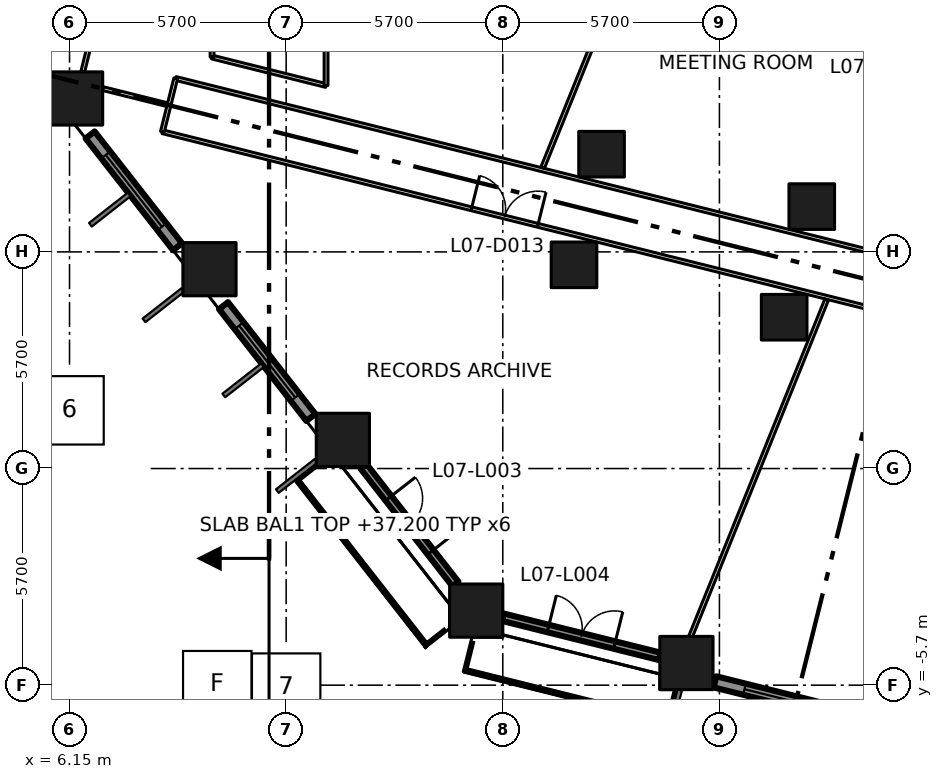
"""IFC4 building model, lengths in metres.
Left out: names, types, materials, properties, quantities, classifications, styles, units other than length and angle.
Written with IfcOpenShell. Run it as: python <this file> out.ifc"""

import sys

from ifc_helpers import new_model, si_unit, direction, frame, frame_2d, origin, origin_2d, place, context, subcontext, project, spatial, rectangle, extrude, element, fill, save


model = new_model("IFC4")
c1 = context("Model", 3, precision=1e-05, world=origin(), true_north=direction((0.0, 1.0)))
c2 = subcontext(c1, "Body", "Model", "MODEL_VIEW")
j1 = project(units=[si_unit("LENGTHUNIT", "METRE"), si_unit("PLANEANGLEUNIT", "RADIAN")], contexts=[c1])
p1 = place(None, origin())
s1 = spatial("IfcSite", under=j1, at=p1, CompositionType="ELEMENT")
p2 = place(p1, origin())
s2 = spatial("IfcBuilding", under=s1, at=p2, CompositionType="ELEMENT")
p3 = place(p2, frame((0.0, 0.0, 37.2)))
s3 = spatial("IfcBuildingStorey", under=s2, at=p3, CompositionType="ELEMENT", Elevation=37.2)
for number, where, z_axis, x_axis in (
    (1, (16.851, -3.738, 0.0), (0.0, 0.0, 1.0), (1.0, 0.0, 0.0)),
    (2, (13.342, 0.754, 0.0), (0.0, 0.0, 1.0), (1.0, 0.0, 0.0)),
    (3, (9.833, 5.245, 0.0), (0.0, 0.0, 1.0), (1.0, 0.0, 0.0)),
    (4, (6.323, 9.737, 0.0), (0.0, 0.0, 1.0), (1.0, 0.0, 0.0)),
    (5, (22.382, -5.117, 0.0), (0.0, 0.0, 1.0), (1.0, 0.0, 0.0)),
):
    element("IfcColumn", number, at=place(p3, frame(where, z_axis=z_axis, x_axis=x_axis)), inside=s3, PredefinedType="COLUMN", context=c2, shape_type="SweptSolid", body=[
        extrude(rectangle(XDim=1.4, YDim=1.4, at=origin_2d()), origin(), (0.0, 0.0, 1.0), 4.2),
    ])
for number, where, z_axis, x_axis in (
    (6, (19.424, 5.36, 0.0), (0.0, 0.0, 1.0), (1.0, 0.0, 0.0)),
    (7, (24.954, 3.981, 0.0), (0.0, 0.0, 1.0), (1.0, 0.0, 0.0)),
    (8, (20.149, 8.271, 0.0), (0.0, 0.0, 1.0), (1.0, 0.0, 0.0)),
    (9, (25.68, 6.892, 0.0), (0.0, 0.0, 1.0), (1.0, 0.0, 0.0)),
):
    element("IfcColumn", number, at=place(p3, frame(where, z_axis=z_axis, x_axis=x_axis)), inside=s3, PredefinedType="COLUMN", context=c2, shape_type="SweptSolid", body=[
        extrude(rectangle(XDim=1.2, YDim=1.2, at=origin_2d()), origin(), (0.0, 0.0, 1.0), 4.2),
    ])
p4 = place(p3, frame((6.692, 8.778, 0.0), z_axis=(0.0, 0.0, 1.0), x_axis=(0.615767067156, -0.787928244833, 0.0)))
e10 = element("IfcWall", 10, at=p4, inside=s3, PredefinedType="SOLIDWALL", context=c2, shape_type="SweptSolid", body=[
    extrude(rectangle(XDim=3.735, YDim=0.3, at=frame_2d((1.868, 0.0))), origin(), (0.0, 0.0, 1.0), 3.1),
])
p5 = place(p4, frame((0.668, 0.0, 0.8)))
e11 = element("IfcOpeningElement", 11, at=p5, cuts=e10, PredefinedType="OPENING", context=c2, shape_type="SweptSolid", body=[
    extrude(rectangle(XDim=2.4, YDim=2.1, at=frame_2d((1.2, 1.05))), frame((0.0, 0.16, 0.0), z_axis=(0.0, -1.0, 0.0), x_axis=(1.0, 0.0, 0.0)), (0.0, 0.0, 1.0), 0.32),
])
p6 = place(p3, frame((10.202, 4.286, 0.0), z_axis=(0.0, 0.0, 1.0), x_axis=(0.615636430057, -0.788030320474, 0.0)))
e12 = element("IfcWall", 12, at=p6, inside=s3, PredefinedType="SOLIDWALL", context=c2, shape_type="SweptSolid", body=[
    extrude(rectangle(XDim=3.734, YDim=0.3, at=frame_2d((1.867, 0.0))), origin(), (0.0, 0.0, 1.0), 3.1),
])
p7 = place(p6, frame((0.667, 0.0, 0.8)))
e13 = element("IfcOpeningElement", 13, at=p7, cuts=e12, PredefinedType="OPENING", context=c2, shape_type="SweptSolid", body=[
    extrude(rectangle(XDim=2.4, YDim=2.1, at=frame_2d((1.2, 1.05))), frame((0.0, 0.16, 0.0), z_axis=(0.0, -1.0, 0.0), x_axis=(1.0, 0.0, 0.0)), (0.0, 0.0, 1.0), 0.32),
])
p8 = place(p3, frame((13.889, 0.054, 0.0), z_axis=(0.0, 0.0, 1.0), x_axis=(0.615546225508, -0.788100783062, 0.0)))
e14 = element("IfcWall", 14, at=p8, inside=s3, PredefinedType="SOLIDWALL", context=c2, shape_type="SweptSolid", body=[
    extrude(rectangle(XDim=3.923, YDim=0.2, at=frame_2d((1.962, 0.0))), origin(), (0.0, 0.0, 1.0), 3.1),
])
p9 = place(p8, frame((1.061, 0.0, 0.0)))
e15 = element("IfcOpeningElement", 15, at=p9, cuts=e14, PredefinedType="OPENING", context=c2, shape_type="SweptSolid", body=[
    extrude(rectangle(XDim=1.8, YDim=2.9, at=frame_2d((0.9, 1.45))), frame((0.0, 0.11, 0.0), z_axis=(0.0, -1.0, 0.0), x_axis=(1.0, 0.0, 0.0)), (0.0, 0.0, 1.0), 0.22),
])
p10 = place(p3, frame((12.398, -0.199, 0.0), z_axis=(0.0, 0.0, 1.0), x_axis=(0.615638738903, -0.788028516719, 0.0)))
e16 = element("IfcWall", 16, at=p10, inside=s3, PredefinedType="SOLIDWALL", context=c2, shape_type="SweptSolid", body=[
    extrude(rectangle(XDim=5.36, YDim=0.4, at=frame_2d((2.68, 0.0))), origin(), (0.0, 0.0, 1.0), 0.3),
])
p11 = place(p3, frame((17.551, -3.912, 0.0), z_axis=(0.0, 0.0, 1.0), x_axis=(0.970304203713, -0.241887891919, 0.0)))
e17 = element("IfcWall", 17, at=p11, inside=s3, PredefinedType="SOLIDWALL", context=c2, shape_type="SweptSolid", body=[
    extrude(rectangle(XDim=4.257, YDim=0.2, at=frame_2d((2.129, 0.0))), origin(), (0.0, 0.0, 1.0), 3.1),
])
p12 = place(p11, frame((1.228, 0.0, 0.0)))
e18 = element("IfcOpeningElement", 18, at=p12, cuts=e17, PredefinedType="OPENING", context=c2, shape_type="SweptSolid", body=[
    extrude(rectangle(XDim=1.8, YDim=2.9, at=frame_2d((0.9, 1.45))), frame((0.0, 0.11, 0.0), z_axis=(0.0, -1.0, 0.0), x_axis=(1.0, 0.0, 0.0)), (0.0, 0.0, 1.0), 0.22),
])
p13 = place(p3, frame((16.694, -5.069, 0.0), z_axis=(0.0, 0.0, 1.0), x_axis=(0.970289679319, -0.241946147329, 0.0)))
e19 = element("IfcWall", 19, at=p13, inside=s3, PredefinedType="SOLIDWALL", context=c2, shape_type="SweptSolid", body=[
    extrude(rectangle(XDim=5.36, YDim=0.4, at=frame_2d((2.68, 0.0))), origin(), (0.0, 0.0, 1.0), 0.3),
])
p14 = place(p3, frame((23.133, -5.613, 0.0), z_axis=(0.0, 0.0, 1.0), x_axis=(0.970303772127, -0.241889623168, 0.0)))
e20 = element("IfcWall", 20, at=p14, inside=s3, PredefinedType="SOLIDWALL", context=c2, shape_type="SweptSolid", body=[
    extrude(rectangle(XDim=4.002, YDim=0.3, at=frame_2d((2.001, 0.0))), origin(), (0.0, 0.0, 1.0), 3.1),
])
p15 = place(p14, frame((0.801, 0.0, 0.8)))
e21 = element("IfcOpeningElement", 21, at=p15, cuts=e20, PredefinedType="OPENING", context=c2, shape_type="SweptSolid", body=[
    extrude(rectangle(XDim=2.4, YDim=2.1, at=frame_2d((1.2, 1.05))), frame((0.0, 0.16, 0.0), z_axis=(0.0, -1.0, 0.0), x_axis=(1.0, 0.0, 0.0)), (0.0, 0.0, 1.0), 0.32),
])
p16 = place(p3, frame((8.594, 8.862, 0.0), z_axis=(0.0, 0.0, 1.0), x_axis=(0.970293746648, -0.241929835316, 0.0)))
e22 = element("IfcWall", 22, at=p16, inside=s3, PredefinedType="PARTITIONING", context=c2, shape_type="SweptSolid", body=[
    extrude(rectangle(XDim=68.375, YDim=0.1, at=frame_2d((34.188, 0.0))), origin(), (0.0, 0.0, 1.0), 3.9),
])
p17 = place(p16, frame((37.708, 0.0, 0.0)))
e23 = element("IfcOpeningElement", 23, at=p17, cuts=e22, PredefinedType="OPENING", context=c2, shape_type="SweptSolid", body=[
    extrude(rectangle(XDim=1.0, YDim=2.1, at=frame_2d((0.5, 1.05))), frame((0.0, 0.06, 0.0), z_axis=(0.0, -1.0, 0.0), x_axis=(1.0, 0.0, 0.0)), (0.0, 0.0, 1.0), 0.12),
])
p18 = place(p16, frame((42.708, 0.0, 0.0)))
e24 = element("IfcOpeningElement", 24, at=p18, cuts=e22, PredefinedType="OPENING", context=c2, shape_type="SweptSolid", body=[
    extrude(rectangle(XDim=1.8, YDim=2.1, at=frame_2d((0.9, 1.05))), frame((0.0, 0.06, 0.0), z_axis=(0.0, -1.0, 0.0), x_axis=(1.0, 0.0, 0.0)), (0.0, 0.0, 1.0), 0.12),
])
p19 = place(p16, frame((58.508, 0.0, 0.0)))
e25 = element("IfcOpeningElement", 25, at=p19, cuts=e22, PredefinedType="OPENING", context=c2, shape_type="SweptSolid", body=[
    extrude(rectangle(XDim=1.8, YDim=2.1, at=frame_2d((0.9, 1.05))), frame((0.0, 0.06, 0.0), z_axis=(0.0, -1.0, 0.0), x_axis=(1.0, 0.0, 0.0)), (0.0, 0.0, 1.0), 0.12),
])
p20 = place(p16, frame((25.408, 0.0, 0.0)))
e26 = element("IfcOpeningElement", 26, at=p20, cuts=e22, PredefinedType="OPENING", context=c2, shape_type="SweptSolid", body=[
    extrude(rectangle(XDim=1.8, YDim=2.1, at=frame_2d((0.9, 1.05))), frame((0.0, 0.06, 0.0), z_axis=(0.0, -1.0, 0.0), x_axis=(1.0, 0.0, 0.0)), (0.0, 0.0, 1.0), 0.12),
])
p21 = place(p16, frame((31.308, 0.0, 0.0)))
e27 = element("IfcOpeningElement", 27, at=p21, cuts=e22, PredefinedType="OPENING", context=c2, shape_type="SweptSolid", body=[
    extrude(rectangle(XDim=1.0, YDim=2.1, at=frame_2d((0.5, 1.05))), frame((0.0, 0.06, 0.0), z_axis=(0.0, -1.0, 0.0), x_axis=(1.0, 0.0, 0.0)), (0.0, 0.0, 1.0), 0.12),
])
p22 = place(p16, frame((8.38, 0.0, 0.0)))
e28 = element("IfcOpeningElement", 28, at=p22, cuts=e22, PredefinedType="OPENING", context=c2, shape_type="SweptSolid", body=[
    extrude(rectangle(XDim=1.8, YDim=2.1, at=frame_2d((0.9, 1.05))), frame((0.0, 0.06, 0.0), z_axis=(0.0, -1.0, 0.0), x_axis=(1.0, 0.0, 0.0)), (0.0, 0.0, 1.0), 0.12),
])
p23 = place(p3, frame((8.944, 10.264, 0.0), z_axis=(0.0, 0.0, 1.0), x_axis=(0.970300504447, -0.241902730595, 0.0)))
e29 = element("IfcWall", 29, at=p23, inside=s3, PredefinedType="PARTITIONING", context=c2, shape_type="SweptSolid", body=[
    extrude(rectangle(XDim=19.879, YDim=0.1, at=frame_2d((9.939, 0.0))), origin(), (0.0, 0.0, 1.0), 3.9),
])
p24 = place(p3, frame((8.944, 10.264, 0.0), z_axis=(0.0, 0.0, 1.0), x_axis=(-0.242297077633, -0.970202105837, 0.0)))
e30 = element("IfcWall", 30, at=p24, inside=s3, PredefinedType="PARTITIONING", context=c2, shape_type="SweptSolid", body=[
    extrude(rectangle(XDim=1.445, YDim=0.1, at=frame_2d((0.722, 0.0))), origin(), (0.0, 0.0, 1.0), 3.9),
])
p25 = place(p3, frame((9.9, 10.826, 0.0), z_axis=(0.0, 0.0, 1.0), x_axis=(0.970290953223, -0.241941038466, 0.0)))
e31 = element("IfcWall", 31, at=p25, inside=s3, PredefinedType="PARTITIONING", context=c2, shape_type="SweptSolid", body=[
    extrude(rectangle(XDim=3.092, YDim=0.1, at=frame_2d((1.546, 0.0))), origin(), (0.0, 0.0, 1.0), 3.9),
])
p26 = place(p3, frame((9.9, 12.2, 0.0), z_axis=(0.0, 0.0, 1.0), x_axis=(0.0, -1.0, 0.0)))
e32 = element("IfcWall", 32, at=p26, inside=s3, PredefinedType="PARTITIONING", context=c2, shape_type="SweptSolid", body=[
    extrude(rectangle(XDim=1.374, YDim=0.1, at=frame_2d((0.687, 0.0))), origin(), (0.0, 0.0, 1.0), 3.9),
])
p27 = place(p3, frame((12.9, 10.078, 0.0), z_axis=(0.0, 0.0, 1.0), x_axis=(0.0, 1.0, 0.0)))
e33 = element("IfcWall", 33, at=p27, inside=s3, PredefinedType="PARTITIONING", context=c2, shape_type="SweptSolid", body=[
    extrude(rectangle(XDim=4.022, YDim=0.1, at=frame_2d((2.011, 0.0))), origin(), (0.0, 0.0, 1.0), 3.9),
])
p28 = place(p3, frame((6.922, 12.138, 0.0), z_axis=(0.0, 0.0, 1.0), x_axis=(-0.242437328426, -0.970167069007, 0.0)))
e34 = element("IfcWall", 34, at=p28, inside=s3, PredefinedType="PARTITIONING", context=c2, shape_type="SweptSolid", body=[
    extrude(rectangle(XDim=1.753, YDim=0.1, at=frame_2d((0.876, 0.0))), origin(), (0.0, 0.0, 1.0), 3.9),
])
p29 = place(p3, frame((8.72, 9.574, 0.0), z_axis=(0.0, 0.0, 1.0), x_axis=(-0.97016712555, 0.242437102155, 0.0)))
e35 = element("IfcWall", 35, at=p29, inside=s3, PredefinedType="PARTITIONING", context=c2, shape_type="SweptSolid", body=[
    extrude(rectangle(XDim=1.749, YDim=0.1, at=frame_2d((0.875, 0.0))), origin(), (0.0, 0.0, 1.0), 3.9),
])
p30 = place(p3, frame((18.599, 7.915, 0.0), z_axis=(0.0, 0.0, 1.0), x_axis=(0.374461839275, 0.927242325892, 0.0)))
e36 = element("IfcWall", 36, at=p30, inside=s3, PredefinedType="PARTITIONING", context=c2, shape_type="SweptSolid", body=[
    extrude(rectangle(XDim=6.67, YDim=0.1, at=frame_2d((3.335, 0.0))), origin(), (0.0, 0.0, 1.0), 3.9),
])
p31 = place(p3, frame((22.493, -4.417, 0.0), z_axis=(0.0, 0.0, 1.0), x_axis=(0.374480366096, 0.92723484372, 0.0)))
e37 = element("IfcWall", 37, at=p31, inside=s3, PredefinedType="PARTITIONING", context=c2, shape_type="SweptSolid", body=[
    extrude(rectangle(XDim=9.558, YDim=0.1, at=frame_2d((4.779, 0.0))), origin(), (0.0, 0.0, 1.0), 3.9),
])
p32 = place(p5, origin())
e38 = element("IfcWindow", 38, at=p32, inside=s3, PartitioningType="DOUBLE_PANEL_VERTICAL", PredefinedType="WINDOW", context=c2, shape_type="SweptSolid", body=[
    extrude(rectangle(XDim=2.4, YDim=2.1, at=frame_2d((1.2, 1.05))), frame((0.0, 0.03, 0.0), z_axis=(0.0, -1.0, 0.0), x_axis=(1.0, 0.0, 0.0)), (0.0, 0.0, 1.0), 0.06),
])
fill(e11, e38)
p33 = place(p7, origin())
e39 = element("IfcWindow", 39, at=p33, inside=s3, PartitioningType="DOUBLE_PANEL_VERTICAL", PredefinedType="WINDOW", context=c2, shape_type="SweptSolid", body=[
    extrude(rectangle(XDim=2.4, YDim=2.1, at=frame_2d((1.2, 1.05))), frame((0.0, 0.03, 0.0), z_axis=(0.0, -1.0, 0.0), x_axis=(1.0, 0.0, 0.0)), (0.0, 0.0, 1.0), 0.06),
])
fill(e13, e39)
p34 = place(p9, origin())
e40 = element("IfcDoor", 40, at=p34, inside=s3, OperationType="DOUBLE_DOOR_SINGLE_SWING", PredefinedType="DOOR", context=c2, shape_type="SweptSolid", body=[
    extrude(rectangle(XDim=1.8, YDim=2.9, at=frame_2d((0.9, 1.45))), frame((0.0, 0.025, 0.0), z_axis=(0.0, -1.0, 0.0), x_axis=(1.0, 0.0, 0.0)), (0.0, 0.0, 1.0), 0.05),
])
fill(e15, e40)
p35 = place(p12, origin())
e41 = element("IfcDoor", 41, at=p35, inside=s3, OperationType="DOUBLE_DOOR_SINGLE_SWING", PredefinedType="DOOR", context=c2, shape_type="SweptSolid", body=[
    extrude(rectangle(XDim=1.8, YDim=2.9, at=frame_2d((0.9, 1.45))), frame((0.0, 0.025, 0.0), z_axis=(0.0, -1.0, 0.0), x_axis=(1.0, 0.0, 0.0)), (0.0, 0.0, 1.0), 0.05),
])
fill(e18, e41)
p36 = place(p15, origin())
e42 = element("IfcWindow", 42, at=p36, inside=s3, PartitioningType="DOUBLE_PANEL_VERTICAL", PredefinedType="WINDOW", context=c2, shape_type="SweptSolid", body=[
    extrude(rectangle(XDim=2.4, YDim=2.1, at=frame_2d((1.2, 1.05))), frame((0.0, 0.03, 0.0), z_axis=(0.0, -1.0, 0.0), x_axis=(1.0, 0.0, 0.0)), (0.0, 0.0, 1.0), 0.06),
])
fill(e21, e42)
p37 = place(p22, origin())
e43 = element("IfcDoor", 43, at=p37, inside=s3, OperationType="DOUBLE_DOOR_SINGLE_SWING", PredefinedType="DOOR", context=c2, shape_type="SweptSolid", body=[
    extrude(rectangle(XDim=1.8, YDim=2.1, at=frame_2d((0.9, 1.05))), frame((0.0, 0.025, 0.0), z_axis=(0.0, -1.0, 0.0), x_axis=(1.0, 0.0, 0.0)), (0.0, 0.0, 1.0), 0.05),
])
fill(e28, e43)
save(model, sys.argv[1])
